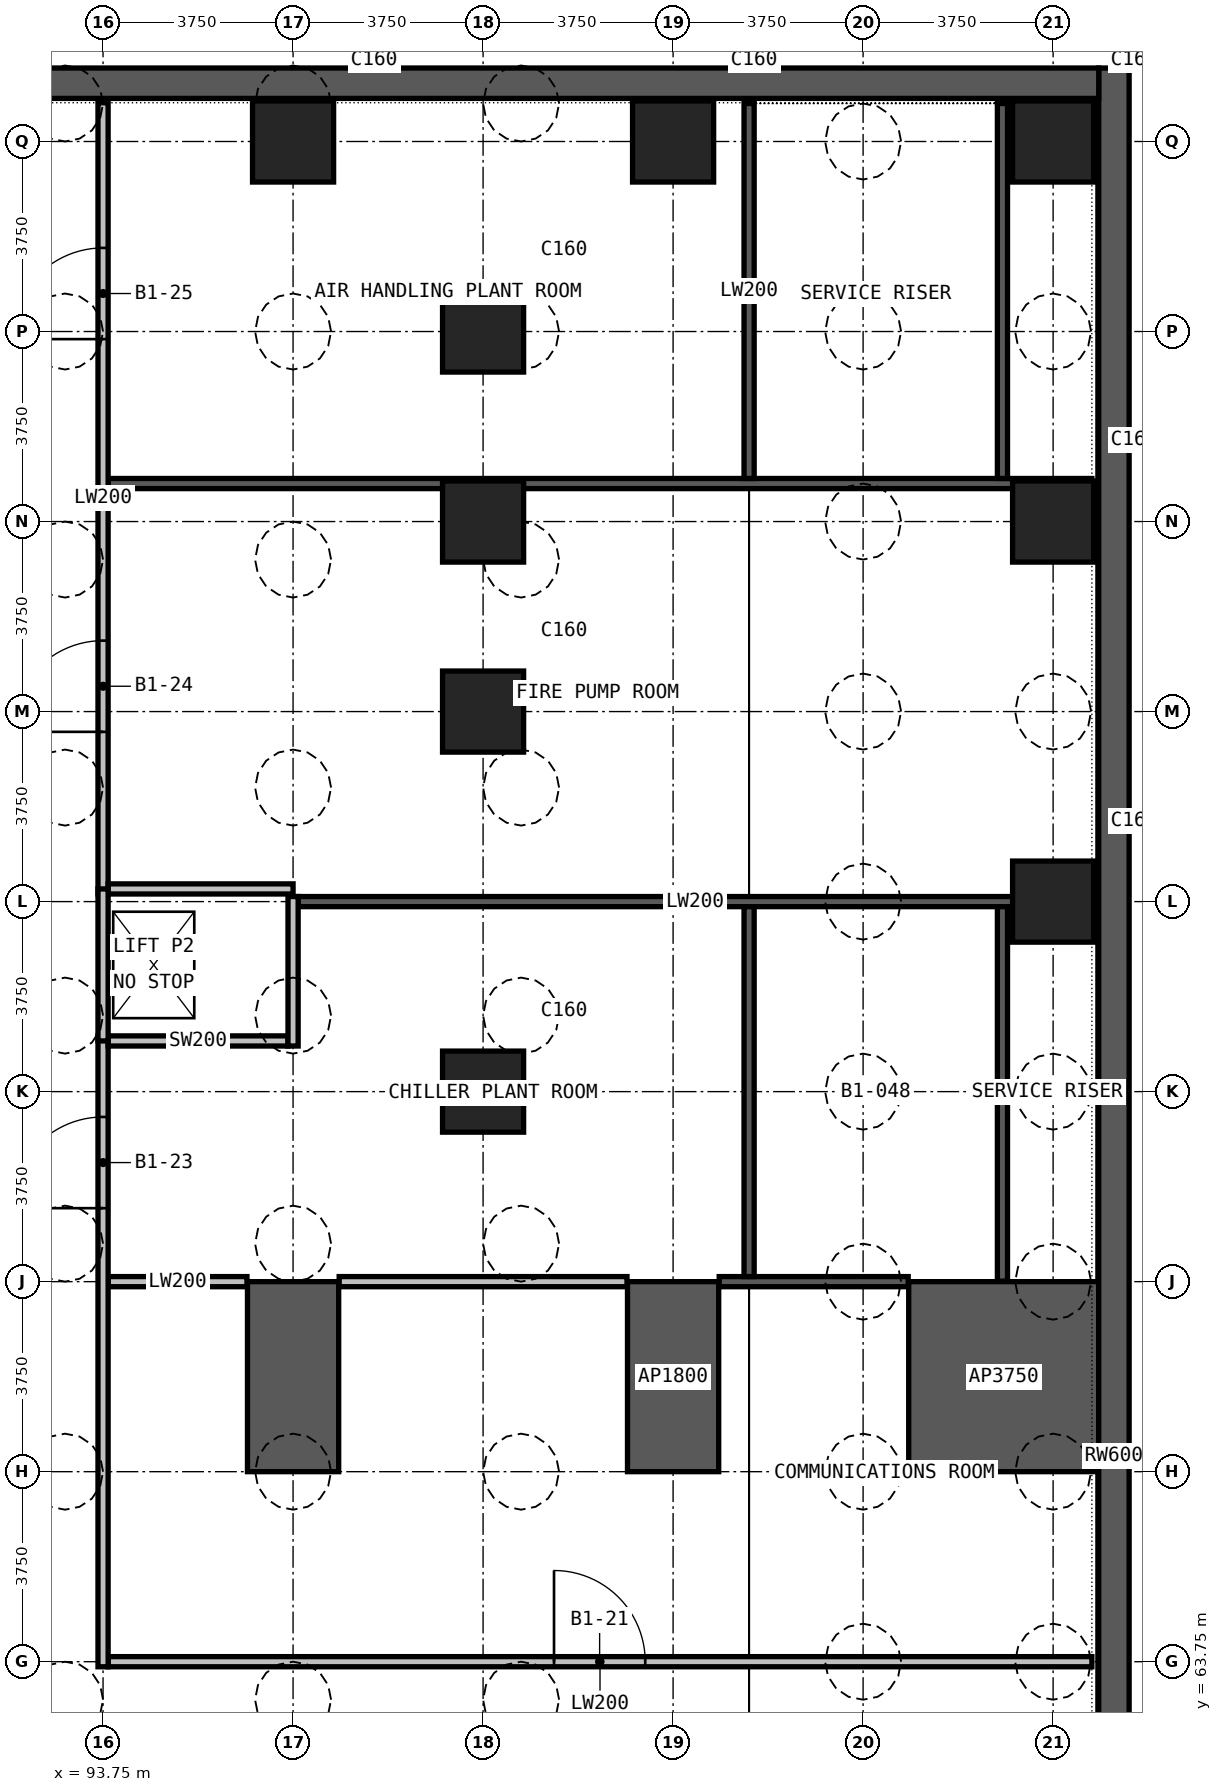
"""IFC4 building model, lengths in metres.
Left out: names, types, materials, properties, quantities, classifications, styles, units other than length and angle.
Written with IfcOpenShell. Run it as: python <this file> out.ifc"""

import sys

from ifc_helpers import new_model, si_unit, direction, frame, frame_2d, origin, origin_2d, place, context, subcontext, project, spatial, rectangle, extrude, element, fill, save


model = new_model("IFC4")
c1 = context("Model", 3, precision=1e-05, world=origin(), true_north=direction((0.0, 1.0)))
c2 = subcontext(c1, "Body", "Model", "MODEL_VIEW")
j1 = project(units=[si_unit("LENGTHUNIT", "METRE"), si_unit("PLANEANGLEUNIT", "RADIAN")], contexts=[c1])
p1 = place(None, origin())
s1 = spatial("IfcSite", under=j1, at=p1, CompositionType="ELEMENT")
p2 = place(p1, origin())
s2 = spatial("IfcBuilding", under=s1, at=p2, CompositionType="ELEMENT")
p3 = place(p2, frame((0.0, 0.0, -6.0)))
s3 = spatial("IfcBuildingStorey", under=s2, at=p3, CompositionType="ELEMENT", Elevation=-6.0)
for number, where, z_axis, x_axis in (
    (1, (97.5, 67.5, 0.0), (0.0, 0.0, 1.0), (0.0, 1.0, 0.0)),
    (2, (105.0, 67.5, 0.0), (0.0, 0.0, 1.0), (0.0, 1.0, 0.0)),
):
    element("IfcWall", number, at=place(p3, frame(where, z_axis=z_axis, x_axis=x_axis)), inside=s3, PredefinedType="SHEAR", context=c2, shape_type="SweptSolid", body=[
        extrude(rectangle(XDim=3.75, YDim=1.8, at=frame_2d((1.875, 0.0))), origin(), (0.0, 0.0, 1.0), 6.0),
    ])
p4 = place(p3, frame((111.525, 67.5, 0.0), z_axis=(0.0, 0.0, 1.0), x_axis=(0.0, 1.0, 0.0)))
e3 = element("IfcWall", 3, at=p4, inside=s3, PredefinedType="SHEAR", context=c2, shape_type="SweptSolid", body=[
    extrude(rectangle(XDim=3.75, YDim=3.75, at=frame_2d((1.875, 0.0))), origin(), (0.0, 0.0, 1.0), 6.0),
])
p5 = place(p3, frame((113.7, 40.4, -0.4), z_axis=(0.0, 0.0, 1.0), x_axis=(0.0, 1.0, 0.0)))
e4 = element("IfcWall", 4, at=p5, inside=s3, PredefinedType="SOLIDWALL", context=c2, shape_type="SweptSolid", body=[
    extrude(rectangle(XDim=54.8, YDim=0.6, at=frame_2d((27.4, 0.0))), origin(), (0.0, 0.0, 1.0), 6.4),
])
p6 = place(p3, frame((36.6, 94.9, -0.4), z_axis=(0.0, 0.0, 1.0), x_axis=(1.0, 0.0, 0.0)))
e5 = element("IfcWall", 5, at=p6, inside=s3, PredefinedType="SOLIDWALL", context=c2, shape_type="SweptSolid", body=[
    extrude(rectangle(XDim=76.8, YDim=0.6, at=frame_2d((38.4, 0.0))), origin(), (0.0, 0.0, 1.0), 6.4),
])
for number, where, z_axis, x_axis in (
    (6, (97.5, 93.75, 0.0), (0.0, 0.0, 1.0), (1.0, 0.0, 0.0)),
    (7, (101.25, 75.0, 0.0), (0.0, 0.0, 1.0), (1.0, 0.0, 0.0)),
    (8, (101.25, 82.5, 0.0), (0.0, 0.0, 1.0), (1.0, 0.0, 0.0)),
    (9, (101.25, 86.25, 0.0), (0.0, 0.0, 1.0), (1.0, 0.0, 0.0)),
    (10, (101.25, 90.0, 0.0), (0.0, 0.0, 1.0), (1.0, 0.0, 0.0)),
    (11, (105.0, 93.75, 0.0), (0.0, 0.0, 1.0), (1.0, 0.0, 0.0)),
    (12, (112.5, 78.75, 0.0), (0.0, 0.0, 1.0), (1.0, 0.0, 0.0)),
    (13, (112.5, 86.25, 0.0), (0.0, 0.0, 1.0), (1.0, 0.0, 0.0)),
    (14, (112.5, 93.75, 0.0), (0.0, 0.0, 1.0), (1.0, 0.0, 0.0)),
):
    element("IfcColumn", number, at=place(p3, frame(where, z_axis=z_axis, x_axis=x_axis)), inside=s3, PredefinedType="COLUMN", context=c2, shape_type="SweptSolid", body=[
        extrude(rectangle(XDim=1.6, YDim=1.6, at=origin_2d()), origin(), (0.0, 0.0, 1.0), 6.0),
    ])
p7 = place(p3, frame((93.85, 63.75, 0.0), z_axis=(0.0, 0.0, 1.0), x_axis=(1.0, 0.0, 0.0)))
e15 = element("IfcWall", 15, at=p7, inside=s3, PredefinedType="PARTITIONING", context=c2, shape_type="SweptSolid", body=[
    extrude(rectangle(XDim=19.415, YDim=0.2, at=frame_2d((9.708, 0.0))), origin(), (0.0, 0.0, 1.0), 5.65),
])
p8 = place(p7, frame((8.8, 0.0, 0.0)))
e16 = element("IfcOpeningElement", 16, at=p8, cuts=e15, PredefinedType="OPENING", context=c2, shape_type="SweptSolid", body=[
    extrude(rectangle(XDim=1.8, YDim=2.4, at=frame_2d((0.9, 1.2))), frame((0.0, 0.11, 0.0), z_axis=(0.0, -1.0, 0.0), x_axis=(1.0, 0.0, 0.0)), (0.0, 0.0, 1.0), 0.22),
])
p9 = place(p3, frame((93.85, 71.25, 0.0), z_axis=(0.0, 0.0, 1.0), x_axis=(1.0, 0.0, 0.0)))
e17 = element("IfcWall", 17, at=p9, inside=s3, PredefinedType="PARTITIONING", context=c2, shape_type="SweptSolid", body=[
    extrude(rectangle(XDim=2.74, YDim=0.2, at=frame_2d((1.37, 0.0))), origin(), (0.0, 0.0, 1.0), 4.85),
])
p10 = place(p3, frame((98.41, 71.25, 0.0), z_axis=(0.0, 0.0, 1.0), x_axis=(1.0, 0.0, 0.0)))
e18 = element("IfcWall", 18, at=p10, inside=s3, PredefinedType="PARTITIONING", context=c2, shape_type="SweptSolid", body=[
    extrude(rectangle(XDim=5.68, YDim=0.2, at=frame_2d((2.84, 0.0))), origin(), (0.0, 0.0, 1.0), 4.85),
])
p11 = place(p3, frame((105.91, 71.25, 0.0), z_axis=(0.0, 0.0, 1.0), x_axis=(1.0, 0.0, 0.0)))
e19 = element("IfcWall", 19, at=p11, inside=s3, PredefinedType="PARTITIONING", context=c2, shape_type="SweptSolid", body=[
    extrude(rectangle(XDim=3.73, YDim=0.2, at=frame_2d((1.865, 0.0))), origin(), (0.0, 0.0, 1.0), 5.65),
])
p12 = place(p3, frame((97.6, 78.75, 0.0), z_axis=(0.0, 0.0, 1.0), x_axis=(1.0, 0.0, 0.0)))
e20 = element("IfcWall", 20, at=p12, inside=s3, PredefinedType="PARTITIONING", context=c2, shape_type="SweptSolid", body=[
    extrude(rectangle(XDim=15.665, YDim=0.2, at=frame_2d((7.833, 0.0))), origin(), (0.0, 0.0, 1.0), 5.65),
])
p13 = place(p3, frame((93.85, 87.0, 0.0), z_axis=(0.0, 0.0, 1.0), x_axis=(1.0, 0.0, 0.0)))
e21 = element("IfcWall", 21, at=p13, inside=s3, PredefinedType="PARTITIONING", context=c2, shape_type="SweptSolid", body=[
    extrude(rectangle(XDim=19.415, YDim=0.2, at=frame_2d((9.708, 0.0))), origin(), (0.0, 0.0, 1.0), 5.65),
])
p14 = place(p3, frame((93.75, 63.65, 0.0), z_axis=(0.0, 0.0, 1.0), x_axis=(0.0, 1.0, 0.0)))
e22 = element("IfcWall", 22, at=p14, inside=s3, PredefinedType="PARTITIONING", context=c2, shape_type="SweptSolid", body=[
    extrude(rectangle(XDim=12.45, YDim=0.2, at=frame_2d((6.225, 0.0))), origin(), (0.0, 0.0, 1.0), 5.65),
])
p15 = place(p14, frame((9.05, 0.0, 0.0)))
e23 = element("IfcOpeningElement", 23, at=p15, cuts=e22, PredefinedType="OPENING", context=c2, shape_type="SweptSolid", body=[
    extrude(rectangle(XDim=1.8, YDim=2.4, at=frame_2d((0.9, 1.2))), frame((0.0, 0.11, 0.0), z_axis=(0.0, -1.0, 0.0), x_axis=(1.0, 0.0, 0.0)), (0.0, 0.0, 1.0), 0.22),
])
p16 = place(p3, frame((93.75, 78.9, 0.0), z_axis=(0.0, 0.0, 1.0), x_axis=(0.0, 1.0, 0.0)))
e24 = element("IfcWall", 24, at=p16, inside=s3, PredefinedType="PARTITIONING", context=c2, shape_type="SweptSolid", body=[
    extrude(rectangle(XDim=15.615, YDim=0.2, at=frame_2d((7.808, 0.0))), origin(), (0.0, 0.0, 1.0), 5.65),
])
p17 = place(p16, frame((3.2, 0.0, 0.0)))
e25 = element("IfcOpeningElement", 25, at=p17, cuts=e24, PredefinedType="OPENING", context=c2, shape_type="SweptSolid", body=[
    extrude(rectangle(XDim=1.8, YDim=2.4, at=frame_2d((0.9, 1.2))), frame((0.0, 0.11, 0.0), z_axis=(0.0, -1.0, 0.0), x_axis=(1.0, 0.0, 0.0)), (0.0, 0.0, 1.0), 0.22),
])
p18 = place(p16, frame((10.95, 0.0, 0.0)))
e26 = element("IfcOpeningElement", 26, at=p18, cuts=e24, PredefinedType="OPENING", context=c2, shape_type="SweptSolid", body=[
    extrude(rectangle(XDim=1.8, YDim=2.4, at=frame_2d((0.9, 1.2))), frame((0.0, 0.11, 0.0), z_axis=(0.0, -1.0, 0.0), x_axis=(1.0, 0.0, 0.0)), (0.0, 0.0, 1.0), 0.22),
])
p19 = place(p3, frame((106.5, 71.35, 0.0), z_axis=(0.0, 0.0, 1.0), x_axis=(0.0, 1.0, 0.0)))
e27 = element("IfcWall", 27, at=p19, inside=s3, PredefinedType="PARTITIONING", context=c2, shape_type="SweptSolid", body=[
    extrude(rectangle(XDim=7.3, YDim=0.2, at=frame_2d((3.65, 0.0))), origin(), (0.0, 0.0, 1.0), 5.65),
])
p20 = place(p3, frame((106.5, 87.1, 0.0), z_axis=(0.0, 0.0, 1.0), x_axis=(0.0, 1.0, 0.0)))
e28 = element("IfcWall", 28, at=p20, inside=s3, PredefinedType="PARTITIONING", context=c2, shape_type="SweptSolid", body=[
    extrude(rectangle(XDim=7.4, YDim=0.2, at=frame_2d((3.7, 0.0))), origin(), (0.0, 0.0, 1.0), 5.65),
])
p21 = place(p3, frame((111.5, 71.26, 0.0), z_axis=(0.0, 0.0, 1.0), x_axis=(0.0, 1.0, 0.0)))
e29 = element("IfcWall", 29, at=p21, inside=s3, PredefinedType="PARTITIONING", context=c2, shape_type="SweptSolid", body=[
    extrude(rectangle(XDim=7.39, YDim=0.2, at=frame_2d((3.695, 0.0))), origin(), (0.0, 0.0, 1.0), 5.65),
])
p22 = place(p3, frame((111.5, 87.1, 0.0), z_axis=(0.0, 0.0, 1.0), x_axis=(0.0, 1.0, 0.0)))
e30 = element("IfcWall", 30, at=p22, inside=s3, PredefinedType="PARTITIONING", context=c2, shape_type="SweptSolid", body=[
    extrude(rectangle(XDim=7.4, YDim=0.2, at=frame_2d((3.7, 0.0))), origin(), (0.0, 0.0, 1.0), 5.65),
])
p23 = place(p3, frame((93.85, 76.0, 0.0), z_axis=(0.0, 0.0, 1.0), x_axis=(1.0, 0.0, 0.0)))
e31 = element("IfcWall", 31, at=p23, inside=s3, PredefinedType="PARTITIONING", context=c2, shape_type="SweptSolid", body=[
    extrude(rectangle(XDim=3.55, YDim=0.2, at=frame_2d((1.775, 0.0))), origin(), (0.0, 0.0, 1.0), 5.65),
])
p24 = place(p3, frame((93.85, 79.0, 0.0), z_axis=(0.0, 0.0, 1.0), x_axis=(1.0, 0.0, 0.0)))
e32 = element("IfcWall", 32, at=p24, inside=s3, PredefinedType="PARTITIONING", context=c2, shape_type="SweptSolid", body=[
    extrude(rectangle(XDim=3.65, YDim=0.2, at=frame_2d((1.825, 0.0))), origin(), (0.0, 0.0, 1.0), 5.65),
])
p25 = place(p3, frame((93.75, 76.0, 0.0), z_axis=(0.0, 0.0, 1.0), x_axis=(0.0, 1.0, 0.0)))
e33 = element("IfcWall", 33, at=p25, inside=s3, PredefinedType="PARTITIONING", context=c2, shape_type="SweptSolid", body=[
    extrude(rectangle(XDim=3.0, YDim=0.2, at=frame_2d((1.5, 0.0))), origin(), (0.0, 0.0, 1.0), 5.65),
])
p26 = place(p3, frame((97.5, 75.9, 0.0), z_axis=(0.0, 0.0, 1.0), x_axis=(0.0, 1.0, 0.0)))
e34 = element("IfcWall", 34, at=p26, inside=s3, PredefinedType="PARTITIONING", context=c2, shape_type="SweptSolid", body=[
    extrude(rectangle(XDim=2.95, YDim=0.2, at=frame_2d((1.475, 0.0))), origin(), (0.0, 0.0, 1.0), 5.65),
])
p27 = place(p8, origin())
e35 = element("IfcDoor", 35, at=p27, inside=s3, OperationType="DOUBLE_DOOR_SINGLE_SWING", PredefinedType="DOOR", context=c2, shape_type="SweptSolid", body=[
    extrude(rectangle(XDim=1.8, YDim=2.4, at=frame_2d((0.9, 1.2))), frame((0.0, 0.025, 0.0), z_axis=(0.0, -1.0, 0.0), x_axis=(1.0, 0.0, 0.0)), (0.0, 0.0, 1.0), 0.05),
])
fill(e16, e35)
p28 = place(p15, origin())
e36 = element("IfcDoor", 36, at=p28, inside=s3, OperationType="DOUBLE_DOOR_SINGLE_SWING", PredefinedType="DOOR", context=c2, shape_type="SweptSolid", body=[
    extrude(rectangle(XDim=1.8, YDim=2.4, at=frame_2d((0.9, 1.2))), frame((0.0, 0.025, 0.0), z_axis=(0.0, -1.0, 0.0), x_axis=(1.0, 0.0, 0.0)), (0.0, 0.0, 1.0), 0.05),
])
fill(e23, e36)
p29 = place(p17, origin())
e37 = element("IfcDoor", 37, at=p29, inside=s3, OperationType="DOUBLE_DOOR_SINGLE_SWING", PredefinedType="DOOR", context=c2, shape_type="SweptSolid", body=[
    extrude(rectangle(XDim=1.8, YDim=2.4, at=frame_2d((0.9, 1.2))), frame((0.0, 0.025, 0.0), z_axis=(0.0, -1.0, 0.0), x_axis=(1.0, 0.0, 0.0)), (0.0, 0.0, 1.0), 0.05),
])
fill(e25, e37)
p30 = place(p18, origin())
e38 = element("IfcDoor", 38, at=p30, inside=s3, OperationType="DOUBLE_DOOR_SINGLE_SWING", PredefinedType="DOOR", context=c2, shape_type="SweptSolid", body=[
    extrude(rectangle(XDim=1.8, YDim=2.4, at=frame_2d((0.9, 1.2))), frame((0.0, 0.025, 0.0), z_axis=(0.0, -1.0, 0.0), x_axis=(1.0, 0.0, 0.0)), (0.0, 0.0, 1.0), 0.05),
])
fill(e26, e38)
save(model, sys.argv[1])
